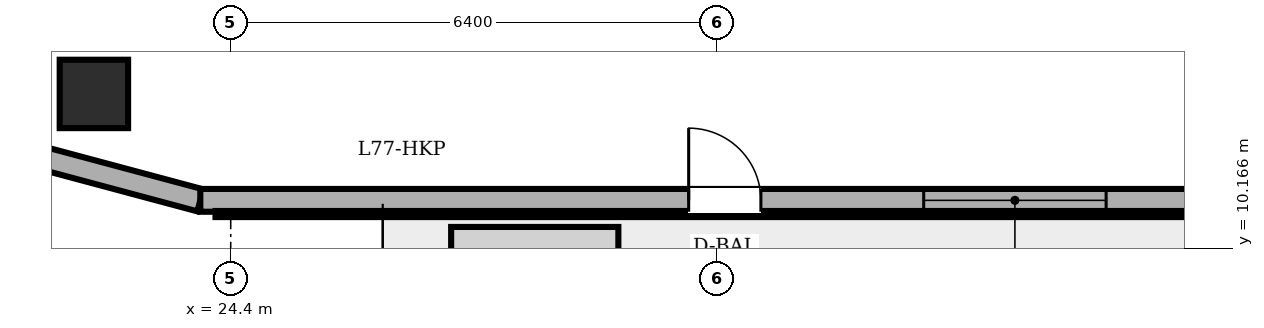
"""IFC4 building model, lengths in metres.
Left out: names, types, materials, properties, quantities, classifications, styles, units other than length and angle.
Written with IfcOpenShell. Run it as: python <this file> out.ifc"""

import sys

from ifc_helpers import new_model, si_unit, direction, frame, frame_2d, origin, origin_2d, place, context, subcontext, project, spatial, rectangle, circle, extrude, element, fill, save


model = new_model("IFC4")
c1 = context("Model", 3, precision=1e-05, world=origin(), true_north=direction((0.0, 1.0)))
c2 = subcontext(c1, "Body", "Model", "MODEL_VIEW")
j1 = project(units=[si_unit("LENGTHUNIT", "METRE"), si_unit("PLANEANGLEUNIT", "RADIAN")], contexts=[c1])
p1 = place(None, origin())
s1 = spatial("IfcSite", under=j1, at=p1, CompositionType="ELEMENT")
p2 = place(p1, origin())
s2 = spatial("IfcBuilding", under=s1, at=p2, CompositionType="ELEMENT")
p3 = place(p2, frame((0.0, 0.0, 295.3)))
s3 = spatial("IfcBuildingStorey", under=s2, at=p3, CompositionType="ELEMENT", Elevation=295.3)
p4 = place(p3, frame((22.6, 12.2, 0.0), z_axis=(0.0, 0.0, 1.0), x_axis=(1.0, 0.0, 0.0)))
e1 = element("IfcColumn", 1, at=p4, inside=s3, PredefinedType="COLUMN", context=c2, shape_type="SweptSolid", body=[
    extrude(circle(Radius=0.45, at=origin_2d()), origin(), (0.0, 0.0, 1.0), 5.1),
])
p5 = place(p3, frame((21.7, 11.416, 0.0), z_axis=(0.0, 0.0, 1.0), x_axis=(0.965960405575, -0.25868995895, 0.0)))
e2 = element("IfcWall", 2, at=p5, inside=s3, PredefinedType="SOLIDWALL", context=c2, shape_type="SweptSolid", body=[
    extrude(rectangle(XDim=2.381, YDim=0.3, at=frame_2d((1.19, 0.0))), origin(), (0.0, 0.0, 1.0), 4.85),
])
p6 = place(p3, frame((24.0, 10.8, 0.0), z_axis=(0.0, 0.0, 1.0), x_axis=(1.0, 0.0, 0.0)))
e3 = element("IfcWall", 3, at=p6, inside=s3, PredefinedType="SOLIDWALL", context=c2, shape_type="SweptSolid", body=[
    extrude(rectangle(XDim=37.03, YDim=0.3, at=frame_2d((18.515, 0.0))), origin(), (0.0, 0.0, 1.0), 4.85),
])
p7 = place(p6, frame((6.425, 0.0, 0.0)))
e4 = element("IfcOpeningElement", 4, at=p7, cuts=e3, PredefinedType="OPENING", context=c2, shape_type="SweptSolid", body=[
    extrude(rectangle(XDim=0.95, YDim=2.2, at=frame_2d((0.475, 1.1))), frame((0.0, 0.16, 0.0), z_axis=(0.0, -1.0, 0.0), x_axis=(1.0, 0.0, 0.0)), (0.0, 0.0, 1.0), 0.32),
])
p8 = place(p6, frame((9.517, 0.0, 0.85)))
e5 = element("IfcOpeningElement", 5, at=p8, cuts=e3, PredefinedType="OPENING", context=c2, shape_type="SweptSolid", body=[
    extrude(rectangle(XDim=2.4, YDim=2.1, at=frame_2d((1.2, 1.05))), frame((0.0, 0.16, 0.0), z_axis=(0.0, -1.0, 0.0), x_axis=(1.0, 0.0, 0.0)), (0.0, 0.0, 1.0), 0.32),
])
p9 = place(p6, frame((19.133, 0.0, 0.85)))
e6 = element("IfcOpeningElement", 6, at=p9, cuts=e3, PredefinedType="OPENING", context=c2, shape_type="SweptSolid", body=[
    extrude(rectangle(XDim=2.4, YDim=2.1, at=frame_2d((1.2, 1.05))), frame((0.0, 0.16, 0.0), z_axis=(0.0, -1.0, 0.0), x_axis=(1.0, 0.0, 0.0)), (0.0, 0.0, 1.0), 0.32),
])
p10 = place(p6, frame((23.567, 0.0, 0.85)))
e7 = element("IfcOpeningElement", 7, at=p10, cuts=e3, PredefinedType="OPENING", context=c2, shape_type="SweptSolid", body=[
    extrude(rectangle(XDim=2.4, YDim=2.1, at=frame_2d((1.2, 1.05))), frame((0.0, 0.16, 0.0), z_axis=(0.0, -1.0, 0.0), x_axis=(1.0, 0.0, 0.0)), (0.0, 0.0, 1.0), 0.32),
])
p11 = place(p6, frame((30.493, 0.0, 0.85)))
e8 = element("IfcOpeningElement", 8, at=p11, cuts=e3, PredefinedType="OPENING", context=c2, shape_type="SweptSolid", body=[
    extrude(rectangle(XDim=2.4, YDim=2.1, at=frame_2d((1.2, 1.05))), frame((0.0, 0.16, 0.0), z_axis=(0.0, -1.0, 0.0), x_axis=(1.0, 0.0, 0.0)), (0.0, 0.0, 1.0), 0.32),
])
p12 = place(p6, frame((32.987, 0.0, 0.85)))
e9 = element("IfcOpeningElement", 9, at=p12, cuts=e3, PredefinedType="OPENING", context=c2, shape_type="SweptSolid", body=[
    extrude(rectangle(XDim=2.4, YDim=2.1, at=frame_2d((1.2, 1.05))), frame((0.0, 0.16, 0.0), z_axis=(0.0, -1.0, 0.0), x_axis=(1.0, 0.0, 0.0)), (0.0, 0.0, 1.0), 0.32),
])
p13 = place(p7, origin())
e10 = element("IfcDoor", 10, at=p13, inside=s3, OperationType="SINGLE_SWING_LEFT", PredefinedType="DOOR", context=c2, shape_type="SweptSolid", body=[
    extrude(rectangle(XDim=0.95, YDim=2.2, at=frame_2d((0.475, 1.1))), frame((0.0, 0.025, 0.0), z_axis=(0.0, -1.0, 0.0), x_axis=(1.0, 0.0, 0.0)), (0.0, 0.0, 1.0), 0.05),
])
fill(e4, e10)
p14 = place(p8, origin())
e11 = element("IfcWindow", 11, at=p14, inside=s3, PartitioningType="TRIPLE_PANEL_VERTICAL", PredefinedType="WINDOW", context=c2, shape_type="SweptSolid", body=[
    extrude(rectangle(XDim=2.4, YDim=2.1, at=frame_2d((1.2, 1.05))), frame((0.0, 0.03, 0.0), z_axis=(0.0, -1.0, 0.0), x_axis=(1.0, 0.0, 0.0)), (0.0, 0.0, 1.0), 0.06),
])
fill(e5, e11)
save(model, sys.argv[1])
